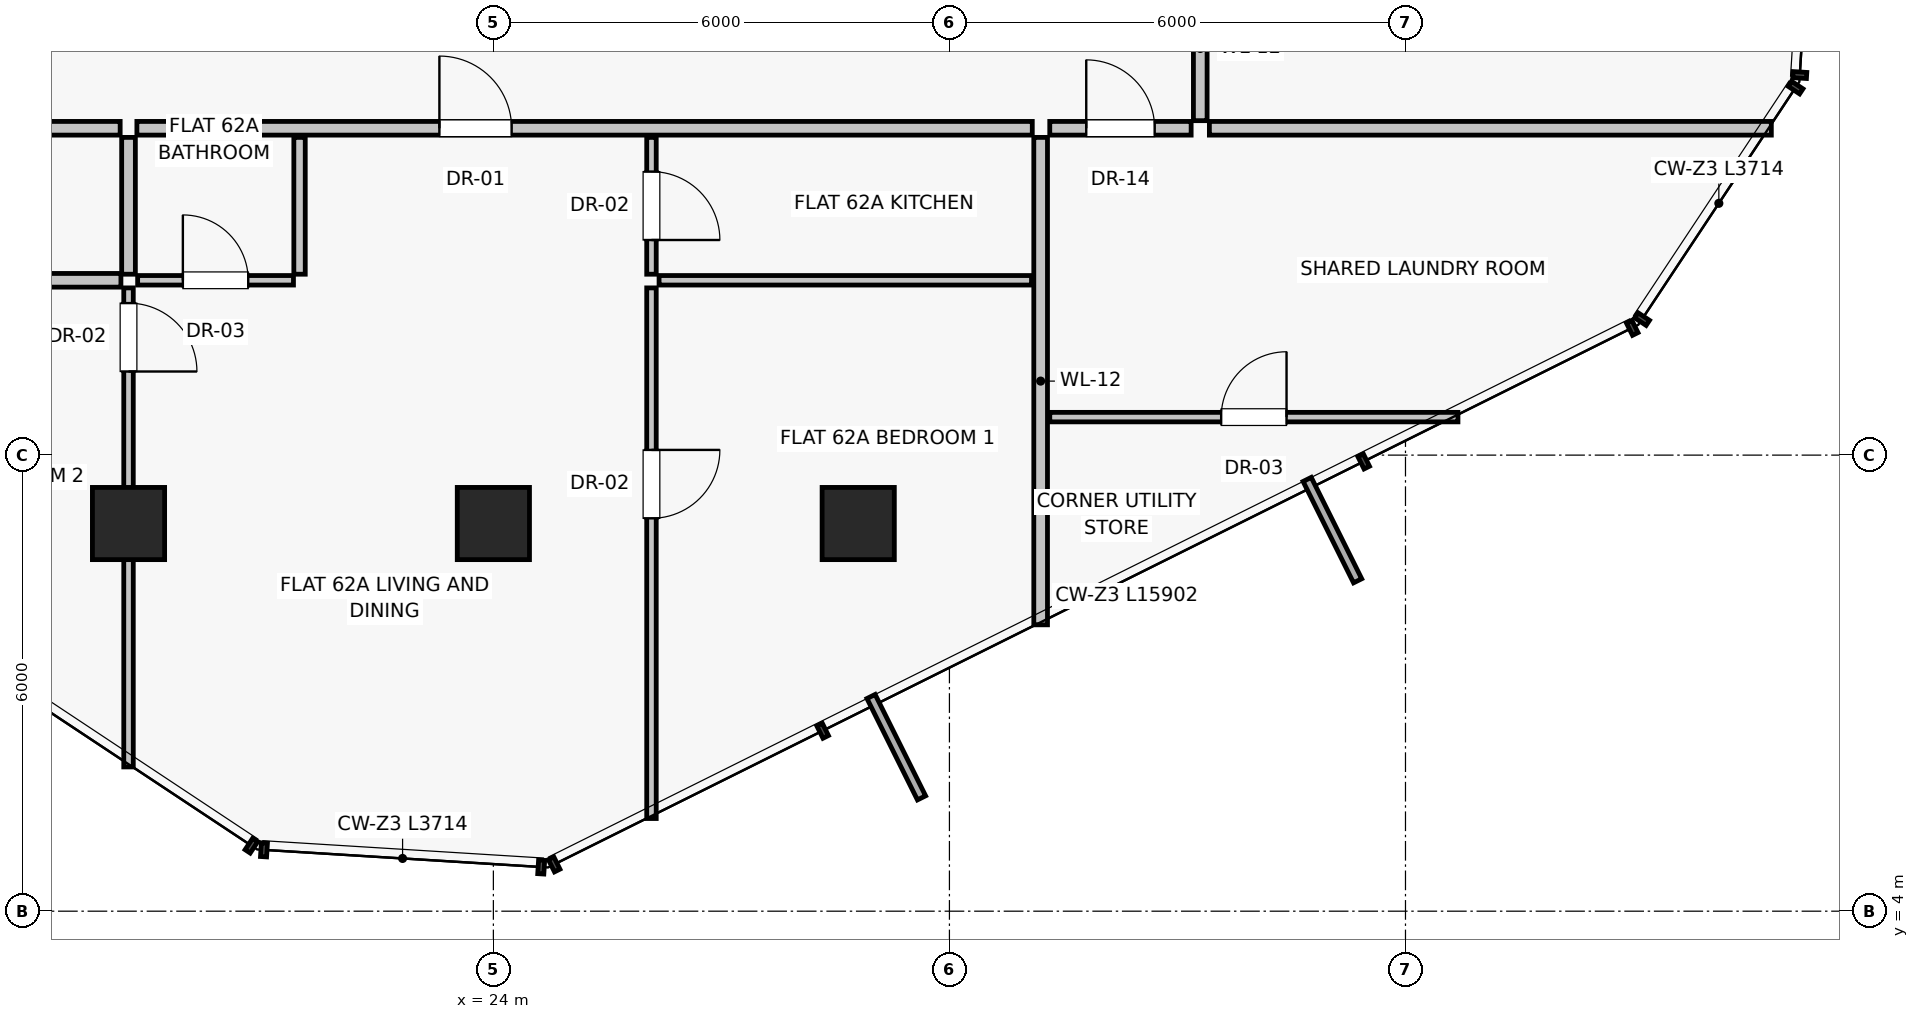
"""IFC4 building model, lengths in metres.
Left out: names, types, materials, properties, quantities, classifications, styles, units other than length and angle.
Written with IfcOpenShell. Run it as: python <this file> out.ifc"""

import sys

from ifc_helpers import new_model, si_unit, direction, frame, frame_2d, origin, origin_2d, place, context, subcontext, project, spatial, rectangle, extrude, source, transform, mapped, element, fill, save


model = new_model("IFC4")
c1 = context("Model", 3, precision=1e-05, world=origin(), true_north=direction((0.0, 1.0)))
c2 = subcontext(c1, "Body", "Model", "MODEL_VIEW")
j1 = project(units=[si_unit("LENGTHUNIT", "METRE"), si_unit("PLANEANGLEUNIT", "RADIAN")], contexts=[c1])
p1 = place(None, origin())
s1 = spatial("IfcSite", under=j1, at=p1, CompositionType="ELEMENT")
p2 = place(p1, origin())
s2 = spatial("IfcBuilding", under=s1, at=p2, CompositionType="ELEMENT")
p3 = place(p2, frame((0.0, 0.0, 218.9)))
s3 = spatial("IfcBuildingStorey", under=s2, at=p3, CompositionType="ELEMENT", Elevation=218.9)
for number, where, z_axis, x_axis in (
    (1, (19.2, 9.1, 0.0), (0.0, 0.0, 1.0), (1.0, 0.0, 0.0)),
    (2, (24.0, 9.1, 0.0), (0.0, 0.0, 1.0), (1.0, 0.0, 0.0)),
    (3, (28.8, 9.1, 0.0), (0.0, 0.0, 1.0), (1.0, 0.0, 0.0)),
):
    element("IfcColumn", number, at=place(p3, frame(where, z_axis=z_axis, x_axis=x_axis)), inside=s3, PredefinedType="COLUMN", context=c2, shape_type="SweptSolid", body=[
        extrude(rectangle(XDim=0.95, YDim=0.95, at=origin_2d()), origin(), (0.0, 0.0, 1.0), 3.25),
    ])
p4 = place(p3, frame((31.2, 14.18, 0.0), z_axis=(0.0, 0.0, 1.0), x_axis=(0.0, -1.0, 0.0)))
e4 = element("IfcWall", 4, at=p4, inside=s3, PredefinedType="PARTITIONING", context=c2, shape_type="SweptSolid", body=[
    extrude(rectangle(XDim=6.412, YDim=0.18, at=frame_2d((3.206, 0.0))), origin(), (0.0, 0.0, 1.0), 3.015),
])
p5 = place(p3, frame((15.31, 14.3, 0.0), z_axis=(0.0, 0.0, 1.0), x_axis=(1.0, 0.0, 0.0)))
e5 = element("IfcWall", 5, at=p5, inside=s3, PredefinedType="PARTITIONING", context=c2, shape_type="SweptSolid", body=[
    extrude(rectangle(XDim=3.78, YDim=0.18, at=frame_2d((1.89, 0.0))), origin(), (0.0, 0.0, 1.0), 3.015),
])
p6 = place(p5, frame((1.39, 0.0, 0.0)))
e6 = element("IfcOpeningElement", 6, at=p6, cuts=e5, PredefinedType="OPENING", context=c2, shape_type="SweptSolid", body=[
    extrude(rectangle(XDim=1.0, YDim=2.01, at=frame_2d((0.5, 1.005))), frame((0.0, 0.1, 0.0), z_axis=(0.0, -1.0, 0.0), x_axis=(1.0, 0.0, 0.0)), (0.0, 0.0, 1.0), 0.2),
])
p7 = place(p3, frame((19.31, 14.3, 0.0), z_axis=(0.0, 0.0, 1.0), x_axis=(1.0, 0.0, 0.0)))
e7 = element("IfcWall", 7, at=p7, inside=s3, PredefinedType="PARTITIONING", context=c2, shape_type="SweptSolid", body=[
    extrude(rectangle(XDim=11.78, YDim=0.18, at=frame_2d((5.89, 0.0))), origin(), (0.0, 0.0, 1.0), 3.015),
])
p8 = place(p7, frame((3.98, 0.0, 0.0)))
e8 = element("IfcOpeningElement", 8, at=p8, cuts=e7, PredefinedType="OPENING", context=c2, shape_type="SweptSolid", body=[
    extrude(rectangle(XDim=0.95, YDim=2.02, at=frame_2d((0.475, 1.01))), frame((0.0, 0.1, 0.0), z_axis=(0.0, -1.0, 0.0), x_axis=(1.0, 0.0, 0.0)), (0.0, 0.0, 1.0), 0.2),
])
p9 = place(p3, frame((15.32, 12.3, 0.0), z_axis=(0.0, 0.0, 1.0), x_axis=(1.0, 0.0, 0.0)))
e9 = element("IfcWall", 9, at=p9, inside=s3, PredefinedType="PARTITIONING", context=c2, shape_type="SweptSolid", body=[
    extrude(rectangle(XDim=3.78, YDim=0.18, at=frame_2d((1.89, 0.0))), origin(), (0.0, 0.0, 1.0), 3.015),
])
p10 = place(p3, frame((19.2, 14.18, 0.0), z_axis=(0.0, 0.0, 1.0), x_axis=(0.0, -1.0, 0.0)))
e10 = element("IfcWall", 10, at=p10, inside=s3, PredefinedType="PARTITIONING", context=c2, shape_type="SweptSolid", body=[
    extrude(rectangle(XDim=1.8, YDim=0.18, at=frame_2d((0.9, 0.0))), origin(), (0.0, 0.0, 1.0), 3.015),
])
p11 = place(p3, frame((19.2, 12.2, 0.0), z_axis=(0.0, 0.0, 1.0), x_axis=(0.0, -1.0, 0.0)))
e11 = element("IfcWall", 11, at=p11, inside=s3, PredefinedType="PARTITIONING", context=c2, shape_type="SweptSolid", body=[
    extrude(rectangle(XDim=6.302, YDim=0.125, at=frame_2d((3.151, 0.0))), origin(), (0.0, 0.0, 1.0), 2.469),
])
p12 = place(p11, frame((0.2, 0.0, 0.0)))
e12 = element("IfcOpeningElement", 12, at=p12, cuts=e11, PredefinedType="OPENING", context=c2, shape_type="SweptSolid", body=[
    extrude(rectangle(XDim=0.9, YDim=2.01, at=frame_2d((0.45, 1.005))), frame((0.0, 0.073, 0.0), z_axis=(0.0, -1.0, 0.0), x_axis=(1.0, 0.0, 0.0)), (0.0, 0.0, 1.0), 0.145),
])
p13 = place(p3, frame((21.45, 14.18, 0.0), z_axis=(0.0, 0.0, 1.0), x_axis=(0.0, -1.0, 0.0)))
e13 = element("IfcWall", 13, at=p13, inside=s3, PredefinedType="PARTITIONING", context=c2, shape_type="SweptSolid", body=[
    extrude(rectangle(XDim=1.8, YDim=0.15, at=frame_2d((0.9, 0.0))), origin(), (0.0, 0.0, 1.0), 3.015),
])
p14 = place(p3, frame((19.32, 12.3, 0.0), z_axis=(0.0, 0.0, 1.0), x_axis=(1.0, 0.0, 0.0)))
e14 = element("IfcWall", 14, at=p14, inside=s3, PredefinedType="PARTITIONING", context=c2, shape_type="SweptSolid", body=[
    extrude(rectangle(XDim=2.05, YDim=0.125, at=frame_2d((1.025, 0.0))), origin(), (0.0, 0.0, 1.0), 3.015),
])
p15 = place(p14, frame((0.595, 0.0, 0.0)))
e15 = element("IfcOpeningElement", 15, at=p15, cuts=e14, PredefinedType="OPENING", context=c2, shape_type="SweptSolid", body=[
    extrude(rectangle(XDim=0.86, YDim=2.01, at=frame_2d((0.43, 1.005))), frame((0.0, 0.073, 0.0), z_axis=(0.0, -1.0, 0.0), x_axis=(1.0, 0.0, 0.0)), (0.0, 0.0, 1.0), 0.145),
])
p16 = place(p3, frame((26.08, 14.18, 0.0), z_axis=(0.0, 0.0, 1.0), x_axis=(0.0, -1.0, 0.0)))
e16 = element("IfcWall", 16, at=p16, inside=s3, PredefinedType="PARTITIONING", context=c2, shape_type="SweptSolid", body=[
    extrude(rectangle(XDim=1.8, YDim=0.125, at=frame_2d((0.9, 0.0))), origin(), (0.0, 0.0, 1.0), 3.015),
])
p17 = place(p16, frame((0.45, 0.0, 0.0)))
e17 = element("IfcOpeningElement", 17, at=p17, cuts=e16, PredefinedType="OPENING", context=c2, shape_type="SweptSolid", body=[
    extrude(rectangle(XDim=0.9, YDim=2.01, at=frame_2d((0.45, 1.005))), frame((0.0, 0.073, 0.0), z_axis=(0.0, -1.0, 0.0), x_axis=(1.0, 0.0, 0.0)), (0.0, 0.0, 1.0), 0.145),
])
p18 = place(p3, frame((26.18, 12.3, 0.0), z_axis=(0.0, 0.0, 1.0), x_axis=(1.0, 0.0, 0.0)))
e18 = element("IfcWall", 18, at=p18, inside=s3, PredefinedType="PARTITIONING", context=c2, shape_type="SweptSolid", body=[
    extrude(rectangle(XDim=4.9, YDim=0.125, at=frame_2d((2.45, 0.0))), origin(), (0.0, 0.0, 1.0), 3.015),
])
p19 = place(p3, frame((26.08, 12.2, 0.0), z_axis=(0.0, 0.0, 1.0), x_axis=(0.0, -1.0, 0.0)))
e19 = element("IfcWall", 19, at=p19, inside=s3, PredefinedType="PARTITIONING", context=c2, shape_type="SweptSolid", body=[
    extrude(rectangle(XDim=6.981, YDim=0.125, at=frame_2d((3.49, 0.0))), origin(), (0.0, 0.0, 1.0), 3.015),
])
p20 = place(p19, frame((2.132, 0.0, 0.0)))
e20 = element("IfcOpeningElement", 20, at=p20, cuts=e19, PredefinedType="OPENING", context=c2, shape_type="SweptSolid", body=[
    extrude(rectangle(XDim=0.9, YDim=2.01, at=frame_2d((0.45, 1.005))), frame((0.0, 0.073, 0.0), z_axis=(0.0, -1.0, 0.0), x_axis=(1.0, 0.0, 0.0)), (0.0, 0.0, 1.0), 0.145),
])
p21 = place(p3, frame((33.3, 14.4, 0.0), z_axis=(0.0, 0.0, 1.0), x_axis=(0.0, 1.0, 0.0)))
e21 = element("IfcWall", 21, at=p21, inside=s3, PredefinedType="PARTITIONING", context=c2, shape_type="SweptSolid", body=[
    extrude(rectangle(XDim=1.9, YDim=0.18, at=frame_2d((0.95, 0.0))), origin(), (0.0, 0.0, 1.0), 3.015),
])
p22 = place(p3, frame((33.42, 14.3, 0.0), z_axis=(0.0, 0.0, 1.0), x_axis=(1.0, 0.0, 0.0)))
e22 = element("IfcWall", 22, at=p22, inside=s3, PredefinedType="PARTITIONING", context=c2, shape_type="SweptSolid", body=[
    extrude(rectangle(XDim=7.393, YDim=0.18, at=frame_2d((3.697, 0.0))), origin(), (0.0, 0.0, 1.0), 3.015),
])
p23 = place(p3, frame((31.32, 14.3, 0.0), z_axis=(0.0, 0.0, 1.0), x_axis=(1.0, 0.0, 0.0)))
e23 = element("IfcWall", 23, at=p23, inside=s3, PredefinedType="PARTITIONING", context=c2, shape_type="SweptSolid", body=[
    extrude(rectangle(XDim=1.86, YDim=0.18, at=frame_2d((0.93, 0.0))), origin(), (0.0, 0.0, 1.0), 3.015),
])
p24 = place(p23, frame((0.48, 0.0, 0.0)))
e24 = element("IfcOpeningElement", 24, at=p24, cuts=e23, PredefinedType="OPENING", context=c2, shape_type="SweptSolid", body=[
    extrude(rectangle(XDim=0.9, YDim=2.01, at=frame_2d((0.45, 1.005))), frame((0.0, 0.1, 0.0), z_axis=(0.0, -1.0, 0.0), x_axis=(1.0, 0.0, 0.0)), (0.0, 0.0, 1.0), 0.2),
])
p25 = place(p3, frame((31.32, 10.5, 0.0), z_axis=(0.0, 0.0, 1.0), x_axis=(1.0, 0.0, 0.0)))
e25 = element("IfcWall", 25, at=p25, inside=s3, PredefinedType="PARTITIONING", context=c2, shape_type="SweptSolid", body=[
    extrude(rectangle(XDim=5.37, YDim=0.125, at=frame_2d((2.685, 0.0))), origin(), (0.0, 0.0, 1.0), 3.015),
])
p26 = place(p25, frame((2.255, 0.0, 0.0)))
e26 = element("IfcOpeningElement", 26, at=p26, cuts=e25, PredefinedType="OPENING", context=c2, shape_type="SweptSolid", body=[
    extrude(rectangle(XDim=0.86, YDim=2.01, at=frame_2d((0.43, 1.005))), frame((0.0, 0.073, 0.0), z_axis=(0.0, -1.0, 0.0), x_axis=(1.0, 0.0, 0.0)), (0.0, 0.0, 1.0), 0.145),
])
m1 = source(origin(), c2, "Body", "SweptSolid", [
    extrude(rectangle(XDim=0.95, YDim=2.02, at=frame_2d((0.475, 1.01))), frame((0.0, 0.025, 0.0), z_axis=(0.0, -1.0, 0.0), x_axis=(1.0, 0.0, 0.0)), (0.0, 0.0, 1.0), 0.05),
])
p27 = place(p8, origin())
e27 = element("IfcDoor", 27, at=p27, inside=s3, OperationType="SINGLE_SWING_LEFT", PredefinedType="DOOR", context=c2, shape_type="MappedRepresentation", body=[
    mapped(m1, transform((0.0, 0.0, 0.0), scale=1.0)),
])
fill(e8, e27)
m2 = source(origin(), c2, "Body", "SweptSolid", [
    extrude(rectangle(XDim=0.9, YDim=2.01, at=frame_2d((0.45, 1.005))), frame((0.0, 0.025, 0.0), z_axis=(0.0, -1.0, 0.0), x_axis=(1.0, 0.0, 0.0)), (0.0, 0.0, 1.0), 0.05),
])
p28 = place(p12, origin())
e28 = element("IfcDoor", 28, at=p28, inside=s3, OperationType="SINGLE_SWING_RIGHT", PredefinedType="DOOR", context=c2, shape_type="MappedRepresentation", body=[
    mapped(m2, transform((0.0, 0.0, 0.0), scale=1.0)),
])
fill(e12, e28)
m3 = source(origin(), c2, "Body", "SweptSolid", [
    extrude(rectangle(XDim=0.86, YDim=2.01, at=frame_2d((0.43, 1.005))), frame((0.0, 0.025, 0.0), z_axis=(0.0, -1.0, 0.0), x_axis=(1.0, 0.0, 0.0)), (0.0, 0.0, 1.0), 0.05),
])
p29 = place(p15, origin())
e29 = element("IfcDoor", 29, at=p29, inside=s3, OperationType="SINGLE_SWING_LEFT", PredefinedType="DOOR", context=c2, shape_type="MappedRepresentation", body=[
    mapped(m3, transform((0.0, 0.0, 0.0), scale=1.0)),
])
fill(e15, e29)
p30 = place(p17, origin())
e30 = element("IfcDoor", 30, at=p30, inside=s3, OperationType="SINGLE_SWING_RIGHT", PredefinedType="DOOR", context=c2, shape_type="MappedRepresentation", body=[
    mapped(m2, transform((0.0, 0.0, 0.0), scale=1.0)),
])
fill(e17, e30)
p31 = place(p20, origin())
e31 = element("IfcDoor", 31, at=p31, inside=s3, OperationType="SINGLE_SWING_LEFT", PredefinedType="DOOR", context=c2, shape_type="MappedRepresentation", body=[
    mapped(m2, transform((0.0, 0.0, 0.0), scale=1.0)),
])
fill(e20, e31)
p32 = place(p24, origin())
e32 = element("IfcDoor", 32, at=p32, inside=s3, OperationType="SINGLE_SWING_LEFT", PredefinedType="DOOR", context=c2, shape_type="MappedRepresentation", body=[
    mapped(m2, transform((0.0, 0.0, 0.0), scale=1.0)),
])
fill(e24, e32)
p33 = place(p26, origin())
e33 = element("IfcDoor", 33, at=p33, inside=s3, OperationType="SINGLE_SWING_RIGHT", PredefinedType="DOOR", context=c2, shape_type="MappedRepresentation", body=[
    mapped(m3, transform((0.0, 0.0, 0.0), scale=1.0)),
])
fill(e26, e33)
save(model, sys.argv[1])
